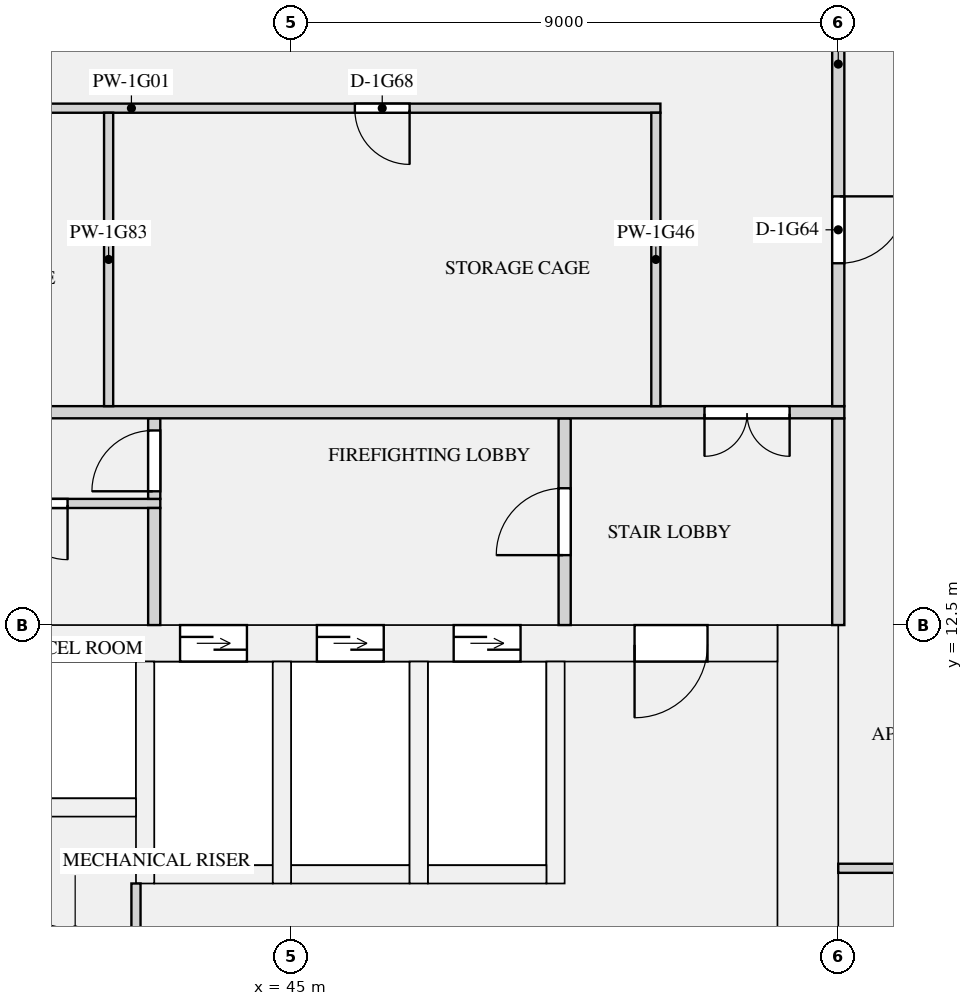
"""IFC4 building model, lengths in metres.
Left out: names, types, materials, properties, quantities, classifications, styles, units other than length and angle.
Written with IfcOpenShell. Run it as: python <this file> out.ifc"""

import sys

from ifc_helpers import new_model, si_unit, direction, frame, frame_2d, origin, place, context, subcontext, project, spatial, rectangle, extrude, element, fill, save


model = new_model("IFC4")
c1 = context("Model", 3, precision=1e-05, world=origin(), true_north=direction((0.0, 1.0)))
c2 = subcontext(c1, "Body", "Model", "MODEL_VIEW")
j1 = project(units=[si_unit("LENGTHUNIT", "METRE"), si_unit("PLANEANGLEUNIT", "RADIAN")], contexts=[c1])
p1 = place(None, origin())
s1 = spatial("IfcSite", under=j1, at=p1, CompositionType="ELEMENT")
p2 = place(p1, origin())
s2 = spatial("IfcBuilding", under=s1, at=p2, CompositionType="ELEMENT")
p3 = place(p2, frame((0.0, 0.0, 66.75)))
s3 = spatial("IfcBuildingStorey", under=s2, at=p3, CompositionType="ELEMENT", Elevation=66.75)
p4 = place(p3, frame((53.5, 0.0, 0.0), z_axis=(0.0, 0.0, 1.0), x_axis=(0.0, 1.0, 0.0)))
e1 = element("IfcWall", 1, at=p4, inside=s3, PredefinedType="SHEAR", context=c2, shape_type="SweptSolid", body=[
    extrude(rectangle(XDim=12.5, YDim=1.0, at=frame_2d((6.25, 0.0))), origin(), (0.0, 0.0, 1.0), 3.15),
])
p5 = place(p3, frame((19.0, 12.2, 0.0), z_axis=(0.0, 0.0, 1.0), x_axis=(1.0, 0.0, 0.0)))
e2 = element("IfcWall", 2, at=p5, inside=s3, PredefinedType="SHEAR", context=c2, shape_type="SweptSolid", body=[
    extrude(rectangle(XDim=34.0, YDim=0.6, at=frame_2d((17.0, 0.0))), origin(), (0.0, 0.0, 1.0), 3.15),
])
p6 = place(p5, frame((4.475, 0.0, 0.0)))
e3 = element("IfcOpeningElement", 3, at=p6, cuts=e2, PredefinedType="OPENING", context=c2, shape_type="SweptSolid", body=[
    extrude(rectangle(XDim=1.2, YDim=2.1, at=frame_2d((0.6, 1.05))), frame((0.0, 0.31, 0.0), z_axis=(0.0, -1.0, 0.0), x_axis=(1.0, 0.0, 0.0)), (0.0, 0.0, 1.0), 0.62),
])
p7 = place(p5, frame((7.325, 0.0, 0.0)))
e4 = element("IfcOpeningElement", 4, at=p7, cuts=e2, PredefinedType="OPENING", context=c2, shape_type="SweptSolid", body=[
    extrude(rectangle(XDim=1.2, YDim=2.1, at=frame_2d((0.6, 1.05))), frame((0.0, 0.31, 0.0), z_axis=(0.0, -1.0, 0.0), x_axis=(1.0, 0.0, 0.0)), (0.0, 0.0, 1.0), 0.62),
])
p8 = place(p5, frame((10.175, 0.0, 0.0)))
e5 = element("IfcOpeningElement", 5, at=p8, cuts=e2, PredefinedType="OPENING", context=c2, shape_type="SweptSolid", body=[
    extrude(rectangle(XDim=1.2, YDim=2.1, at=frame_2d((0.6, 1.05))), frame((0.0, 0.31, 0.0), z_axis=(0.0, -1.0, 0.0), x_axis=(1.0, 0.0, 0.0)), (0.0, 0.0, 1.0), 0.62),
])
p9 = place(p5, frame((13.025, 0.0, 0.0)))
e6 = element("IfcOpeningElement", 6, at=p9, cuts=e2, PredefinedType="OPENING", context=c2, shape_type="SweptSolid", body=[
    extrude(rectangle(XDim=1.2, YDim=2.1, at=frame_2d((0.6, 1.05))), frame((0.0, 0.31, 0.0), z_axis=(0.0, -1.0, 0.0), x_axis=(1.0, 0.0, 0.0)), (0.0, 0.0, 1.0), 0.62),
])
p10 = place(p5, frame((15.875, 0.0, 0.0)))
e7 = element("IfcOpeningElement", 7, at=p10, cuts=e2, PredefinedType="OPENING", context=c2, shape_type="SweptSolid", body=[
    extrude(rectangle(XDim=1.2, YDim=2.1, at=frame_2d((0.6, 1.05))), frame((0.0, 0.31, 0.0), z_axis=(0.0, -1.0, 0.0), x_axis=(1.0, 0.0, 0.0)), (0.0, 0.0, 1.0), 0.62),
])
p11 = place(p5, frame((24.175, 0.0, 0.0)))
e8 = element("IfcOpeningElement", 8, at=p11, cuts=e2, PredefinedType="OPENING", context=c2, shape_type="SweptSolid", body=[
    extrude(rectangle(XDim=1.1, YDim=2.1, at=frame_2d((0.55, 1.05))), frame((0.0, 0.31, 0.0), z_axis=(0.0, -1.0, 0.0), x_axis=(1.0, 0.0, 0.0)), (0.0, 0.0, 1.0), 0.62),
])
p12 = place(p5, frame((26.425, 0.0, 0.0)))
e9 = element("IfcOpeningElement", 9, at=p12, cuts=e2, PredefinedType="OPENING", context=c2, shape_type="SweptSolid", body=[
    extrude(rectangle(XDim=1.1, YDim=2.1, at=frame_2d((0.55, 1.05))), frame((0.0, 0.31, 0.0), z_axis=(0.0, -1.0, 0.0), x_axis=(1.0, 0.0, 0.0)), (0.0, 0.0, 1.0), 0.62),
])
p13 = place(p5, frame((28.675, 0.0, 0.0)))
e10 = element("IfcOpeningElement", 10, at=p13, cuts=e2, PredefinedType="OPENING", context=c2, shape_type="SweptSolid", body=[
    extrude(rectangle(XDim=1.1, YDim=2.1, at=frame_2d((0.55, 1.05))), frame((0.0, 0.31, 0.0), z_axis=(0.0, -1.0, 0.0), x_axis=(1.0, 0.0, 0.0)), (0.0, 0.0, 1.0), 0.62),
])
p14 = place(p5, frame((1.15, 0.0, 0.0)))
e11 = element("IfcOpeningElement", 11, at=p14, cuts=e2, PredefinedType="OPENING", context=c2, shape_type="SweptSolid", body=[
    extrude(rectangle(XDim=1.2, YDim=2.1, at=frame_2d((0.6, 1.05))), frame((0.0, 0.31, 0.0), z_axis=(0.0, -1.0, 0.0), x_axis=(1.0, 0.0, 0.0)), (0.0, 0.0, 1.0), 0.62),
])
p15 = place(p5, frame((31.65, 0.0, 0.0)))
e12 = element("IfcOpeningElement", 12, at=p15, cuts=e2, PredefinedType="OPENING", context=c2, shape_type="SweptSolid", body=[
    extrude(rectangle(XDim=1.2, YDim=2.1, at=frame_2d((0.6, 1.05))), frame((0.0, 0.31, 0.0), z_axis=(0.0, -1.0, 0.0), x_axis=(1.0, 0.0, 0.0)), (0.0, 0.0, 1.0), 0.62),
])
p16 = place(p3, frame((39.9, 9.5, 0.0), z_axis=(0.0, 0.0, 1.0), x_axis=(1.0, 0.0, 0.0)))
e13 = element("IfcWall", 13, at=p16, inside=s3, PredefinedType="SHEAR", context=c2, shape_type="SweptSolid", body=[
    extrude(rectangle(XDim=2.55, YDim=0.3, at=frame_2d((1.275, 0.0))), origin(), (0.0, 0.0, 1.0), 3.15),
])
p17 = place(p3, frame((42.75, 8.4, 0.0), z_axis=(0.0, 0.0, 1.0), x_axis=(1.0, 0.0, 0.0)))
e14 = element("IfcWall", 14, at=p17, inside=s3, PredefinedType="SHEAR", context=c2, shape_type="SweptSolid", body=[
    extrude(rectangle(XDim=1.95, YDim=0.3, at=frame_2d((0.975, 0.0))), origin(), (0.0, 0.0, 1.0), 3.15),
])
p18 = place(p3, frame((42.6, 8.25, 0.0), z_axis=(0.0, 0.0, 1.0), x_axis=(0.0, 1.0, 0.0)))
e15 = element("IfcWall", 15, at=p18, inside=s3, PredefinedType="SHEAR", context=c2, shape_type="SweptSolid", body=[
    extrude(rectangle(XDim=3.65, YDim=0.3, at=frame_2d((1.825, 0.0))), origin(), (0.0, 0.0, 1.0), 3.15),
])
p19 = place(p3, frame((45.0, 8.4, 0.0), z_axis=(0.0, 0.0, 1.0), x_axis=(1.0, 0.0, 0.0)))
e16 = element("IfcWall", 16, at=p19, inside=s3, PredefinedType="SHEAR", context=c2, shape_type="SweptSolid", body=[
    extrude(rectangle(XDim=1.95, YDim=0.3, at=frame_2d((0.975, 0.0))), origin(), (0.0, 0.0, 1.0), 3.15),
])
p20 = place(p3, frame((44.85, 8.25, 0.0), z_axis=(0.0, 0.0, 1.0), x_axis=(0.0, 1.0, 0.0)))
e17 = element("IfcWall", 17, at=p20, inside=s3, PredefinedType="SHEAR", context=c2, shape_type="SweptSolid", body=[
    extrude(rectangle(XDim=3.65, YDim=0.3, at=frame_2d((1.825, 0.0))), origin(), (0.0, 0.0, 1.0), 3.15),
])
p21 = place(p3, frame((47.25, 8.4, 0.0), z_axis=(0.0, 0.0, 1.0), x_axis=(1.0, 0.0, 0.0)))
e18 = element("IfcWall", 18, at=p21, inside=s3, PredefinedType="SHEAR", context=c2, shape_type="SweptSolid", body=[
    extrude(rectangle(XDim=1.95, YDim=0.3, at=frame_2d((0.975, 0.0))), origin(), (0.0, 0.0, 1.0), 3.15),
])
for number, where, z_axis, x_axis in (
    (19, (47.1, 8.25, 0.0), (0.0, 0.0, 1.0), (0.0, 1.0, 0.0)),
    (20, (49.35, 8.25, 0.0), (0.0, 0.0, 1.0), (0.0, 1.0, 0.0)),
):
    element("IfcWall", number, at=place(p3, frame(where, z_axis=z_axis, x_axis=x_axis)), inside=s3, PredefinedType="SHEAR", context=c2, shape_type="SweptSolid", body=[
        extrude(rectangle(XDim=3.65, YDim=0.3, at=frame_2d((1.825, 0.0))), origin(), (0.0, 0.0, 1.0), 3.15),
    ])
p22 = place(p3, frame((38.925, 14.5, 0.0), z_axis=(0.0, 0.0, 1.0), x_axis=(1.0, 0.0, 0.0)))
e21 = element("IfcWall", 21, at=p22, inside=s3, PredefinedType="PARTITIONING", context=c2, shape_type="SweptSolid", body=[
    extrude(rectangle(XDim=3.925, YDim=0.15, at=frame_2d((1.962, 0.0))), origin(), (0.0, 0.0, 1.0), 2.83),
])
p23 = place(p22, frame((1.5, 0.0, 0.0)))
e22 = element("IfcOpeningElement", 22, at=p23, cuts=e21, PredefinedType="OPENING", context=c2, shape_type="SweptSolid", body=[
    extrude(rectangle(XDim=0.9, YDim=2.1, at=frame_2d((0.45, 1.05))), frame((0.0, 0.085, 0.0), z_axis=(0.0, -1.0, 0.0), x_axis=(1.0, 0.0, 0.0)), (0.0, 0.0, 1.0), 0.17),
])
p24 = place(p3, frame((42.45, 6.65, 0.0), z_axis=(0.0, 0.0, 1.0), x_axis=(0.0, 1.0, 0.0)))
e23 = element("IfcWall", 23, at=p24, inside=s3, PredefinedType="PARTITIONING", context=c2, shape_type="SweptSolid", body=[
    extrude(rectangle(XDim=1.6, YDim=0.15, at=frame_2d((0.8, 0.0))), origin(), (0.0, 0.0, 1.0), 2.83),
])
p25 = place(p3, frame((42.75, 12.5, 0.0), z_axis=(0.0, 0.0, 1.0), x_axis=(0.0, 1.0, 0.0)))
e24 = element("IfcWall", 24, at=p25, inside=s3, PredefinedType="PARTITIONING", context=c2, shape_type="SweptSolid", body=[
    extrude(rectangle(XDim=1.925, YDim=0.2, at=frame_2d((0.962, 0.0))), origin(), (0.0, 0.0, 1.0), 2.83),
])
p26 = place(p3, frame((49.5, 12.5, 0.0), z_axis=(0.0, 0.0, 1.0), x_axis=(0.0, 1.0, 0.0)))
e25 = element("IfcWall", 25, at=p26, inside=s3, PredefinedType="PARTITIONING", context=c2, shape_type="SweptSolid", body=[
    extrude(rectangle(XDim=3.4, YDim=0.2, at=frame_2d((1.7, 0.0))), origin(), (0.0, 0.0, 1.0), 2.83),
])
p27 = place(p26, frame((1.15, 0.0, 0.0)))
e26 = element("IfcOpeningElement", 26, at=p27, cuts=e25, PredefinedType="OPENING", context=c2, shape_type="SweptSolid", body=[
    extrude(rectangle(XDim=1.1, YDim=2.1, at=frame_2d((0.55, 1.05))), frame((0.0, 0.11, 0.0), z_axis=(0.0, -1.0, 0.0), x_axis=(1.0, 0.0, 0.0)), (0.0, 0.0, 1.0), 0.22),
])
p28 = place(p3, frame((54.0, 12.5, 0.0), z_axis=(0.0, 0.0, 1.0), x_axis=(0.0, 1.0, 0.0)))
e27 = element("IfcWall", 27, at=p28, inside=s3, PredefinedType="PARTITIONING", context=c2, shape_type="SweptSolid", body=[
    extrude(rectangle(XDim=3.4, YDim=0.2, at=frame_2d((1.7, 0.0))), origin(), (0.0, 0.0, 1.0), 2.83),
])
p29 = place(p3, frame((42.75, 14.575, 0.0), z_axis=(0.0, 0.0, 1.0), x_axis=(0.0, 1.0, 0.0)))
e28 = element("IfcWall", 28, at=p29, inside=s3, PredefinedType="PARTITIONING", context=c2, shape_type="SweptSolid", body=[
    extrude(rectangle(XDim=1.325, YDim=0.2, at=frame_2d((0.663, 0.0))), origin(), (0.0, 0.0, 1.0), 2.83),
])
p30 = place(p29, frame((0.125, 0.0, 0.0)))
e29 = element("IfcOpeningElement", 29, at=p30, cuts=e28, PredefinedType="OPENING", context=c2, shape_type="SweptSolid", body=[
    extrude(rectangle(XDim=1.0, YDim=2.1, at=frame_2d((0.5, 1.05))), frame((0.0, 0.11, 0.0), z_axis=(0.0, -1.0, 0.0), x_axis=(1.0, 0.0, 0.0)), (0.0, 0.0, 1.0), 0.22),
])
p31 = place(p3, frame((20.925, 21.0, 0.0), z_axis=(0.0, 0.0, 1.0), x_axis=(1.0, 0.0, 0.0)))
e30 = element("IfcWall", 30, at=p31, inside=s3, PredefinedType="PARTITIONING", context=c2, shape_type="SweptSolid", body=[
    extrude(rectangle(XDim=30.15, YDim=0.15, at=frame_2d((15.075, 0.0))), origin(), (0.0, 0.0, 1.0), 2.83),
])
p32 = place(p31, frame((4.125, 0.0, 0.0)))
e31 = element("IfcOpeningElement", 31, at=p32, cuts=e30, PredefinedType="OPENING", context=c2, shape_type="SweptSolid", body=[
    extrude(rectangle(XDim=0.9, YDim=2.1, at=frame_2d((0.45, 1.05))), frame((0.0, 0.085, 0.0), z_axis=(0.0, -1.0, 0.0), x_axis=(1.0, 0.0, 0.0)), (0.0, 0.0, 1.0), 0.17),
])
p33 = place(p31, frame((10.875, 0.0, 0.0)))
e32 = element("IfcOpeningElement", 32, at=p33, cuts=e30, PredefinedType="OPENING", context=c2, shape_type="SweptSolid", body=[
    extrude(rectangle(XDim=0.9, YDim=2.1, at=frame_2d((0.45, 1.05))), frame((0.0, 0.085, 0.0), z_axis=(0.0, -1.0, 0.0), x_axis=(1.0, 0.0, 0.0)), (0.0, 0.0, 1.0), 0.17),
])
p34 = place(p31, frame((16.875, 0.0, 0.0)))
e33 = element("IfcOpeningElement", 33, at=p34, cuts=e30, PredefinedType="OPENING", context=c2, shape_type="SweptSolid", body=[
    extrude(rectangle(XDim=0.9, YDim=2.1, at=frame_2d((0.45, 1.05))), frame((0.0, 0.085, 0.0), z_axis=(0.0, -1.0, 0.0), x_axis=(1.0, 0.0, 0.0)), (0.0, 0.0, 1.0), 0.17),
])
p35 = place(p31, frame((25.125, 0.0, 0.0)))
e34 = element("IfcOpeningElement", 34, at=p35, cuts=e30, PredefinedType="OPENING", context=c2, shape_type="SweptSolid", body=[
    extrude(rectangle(XDim=0.9, YDim=2.1, at=frame_2d((0.45, 1.05))), frame((0.0, 0.085, 0.0), z_axis=(0.0, -1.0, 0.0), x_axis=(1.0, 0.0, 0.0)), (0.0, 0.0, 1.0), 0.17),
])
p36 = place(p3, frame((54.0, 8.5, 0.0), z_axis=(0.0, 0.0, 1.0), x_axis=(1.0, 0.0, 0.0)))
e35 = element("IfcWall", 35, at=p36, inside=s3, PredefinedType="PARTITIONING", context=c2, shape_type="SweptSolid", body=[
    extrude(rectangle(XDim=21.7, YDim=0.15, at=frame_2d((10.85, 0.0))), origin(), (0.0, 0.0, 1.0), 2.83),
])
p37 = place(p36, frame((6.3, 0.0, 0.0)))
e36 = element("IfcOpeningElement", 36, at=p37, cuts=e35, PredefinedType="OPENING", context=c2, shape_type="SweptSolid", body=[
    extrude(rectangle(XDim=0.9, YDim=2.1, at=frame_2d((0.45, 1.05))), frame((0.0, 0.085, 0.0), z_axis=(0.0, -1.0, 0.0), x_axis=(1.0, 0.0, 0.0)), (0.0, 0.0, 1.0), 0.17),
])
p38 = place(p36, frame((1.8, 0.0, 0.0)))
e37 = element("IfcOpeningElement", 37, at=p38, cuts=e35, PredefinedType="OPENING", context=c2, shape_type="SweptSolid", body=[
    extrude(rectangle(XDim=0.9, YDim=2.1, at=frame_2d((0.45, 1.05))), frame((0.0, 0.085, 0.0), z_axis=(0.0, -1.0, 0.0), x_axis=(1.0, 0.0, 0.0)), (0.0, 0.0, 1.0), 0.17),
])
p39 = place(p36, frame((10.8, 0.0, 0.0)))
e38 = element("IfcOpeningElement", 38, at=p39, cuts=e35, PredefinedType="OPENING", context=c2, shape_type="SweptSolid", body=[
    extrude(rectangle(XDim=0.9, YDim=2.1, at=frame_2d((0.45, 1.05))), frame((0.0, 0.085, 0.0), z_axis=(0.0, -1.0, 0.0), x_axis=(1.0, 0.0, 0.0)), (0.0, 0.0, 1.0), 0.17),
])
p40 = place(p36, frame((19.175, 0.0, 0.0)))
e39 = element("IfcOpeningElement", 39, at=p40, cuts=e35, PredefinedType="OPENING", context=c2, shape_type="SweptSolid", body=[
    extrude(rectangle(XDim=1.5, YDim=2.1, at=frame_2d((0.75, 1.05))), frame((0.0, 0.085, 0.0), z_axis=(0.0, -1.0, 0.0), x_axis=(1.0, 0.0, 0.0)), (0.0, 0.0, 1.0), 0.17),
])
p41 = place(p3, frame((17.9, 16.0, 0.0), z_axis=(0.0, 0.0, 1.0), x_axis=(1.0, 0.0, 0.0)))
e40 = element("IfcWall", 40, at=p41, inside=s3, PredefinedType="PARTITIONING", context=c2, shape_type="SweptSolid", body=[
    extrude(rectangle(XDim=36.2, YDim=0.2, at=frame_2d((18.1, 0.0))), origin(), (0.0, 0.0, 1.0), 2.83),
])
p42 = place(p41, frame((0.9, 0.0, 0.0)))
e41 = element("IfcOpeningElement", 41, at=p42, cuts=e40, PredefinedType="OPENING", context=c2, shape_type="SweptSolid", body=[
    extrude(rectangle(XDim=1.4, YDim=2.1, at=frame_2d((0.7, 1.05))), frame((0.0, 0.11, 0.0), z_axis=(0.0, -1.0, 0.0), x_axis=(1.0, 0.0, 0.0)), (0.0, 0.0, 1.0), 0.22),
])
p43 = place(p41, frame((33.9, 0.0, 0.0)))
e42 = element("IfcOpeningElement", 42, at=p43, cuts=e40, PredefinedType="OPENING", context=c2, shape_type="SweptSolid", body=[
    extrude(rectangle(XDim=1.4, YDim=2.1, at=frame_2d((0.7, 1.05))), frame((0.0, 0.11, 0.0), z_axis=(0.0, -1.0, 0.0), x_axis=(1.0, 0.0, 0.0)), (0.0, 0.0, 1.0), 0.22),
])
p44 = place(p3, frame((54.0, 16.1, 0.0), z_axis=(0.0, 0.0, 1.0), x_axis=(0.0, 1.0, 0.0)))
e43 = element("IfcWall", 43, at=p44, inside=s3, PredefinedType="PARTITIONING", context=c2, shape_type="SweptSolid", body=[
    extrude(rectangle(XDim=7.8, YDim=0.2, at=frame_2d((3.9, 0.0))), origin(), (0.0, 0.0, 1.0), 2.83),
])
p45 = place(p44, frame((2.35, 0.0, 0.0)))
e44 = element("IfcOpeningElement", 44, at=p45, cuts=e43, PredefinedType="OPENING", context=c2, shape_type="SweptSolid", body=[
    extrude(rectangle(XDim=1.1, YDim=2.1, at=frame_2d((0.55, 1.05))), frame((0.0, 0.11, 0.0), z_axis=(0.0, -1.0, 0.0), x_axis=(1.0, 0.0, 0.0)), (0.0, 0.0, 1.0), 0.22),
])
for number, where, z_axis, x_axis in (
    (45, (51.0, 16.1, 0.0), (0.0, 0.0, 1.0), (0.0, 1.0, 0.0)),
    (46, (42.0, 16.1, 0.0), (0.0, 0.0, 1.0), (0.0, 1.0, 0.0)),
):
    element("IfcWall", number, at=place(p3, frame(where, z_axis=z_axis, x_axis=x_axis)), inside=s3, PredefinedType="PARTITIONING", context=c2, shape_type="SweptSolid", body=[
        extrude(rectangle(XDim=4.825, YDim=0.15, at=frame_2d((2.413, 0.0))), origin(), (0.0, 0.0, 1.0), 2.83),
    ])
p46 = place(p11, origin())
e47 = element("IfcDoor", 47, at=p46, inside=s3, OperationType="DOUBLE_DOOR_SLIDING", PredefinedType="DOOR", context=c2, shape_type="SweptSolid", body=[
    extrude(rectangle(XDim=1.1, YDim=2.1, at=frame_2d((0.55, 1.05))), frame((0.0, 0.025, 0.0), z_axis=(0.0, -1.0, 0.0), x_axis=(1.0, 0.0, 0.0)), (0.0, 0.0, 1.0), 0.05),
])
fill(e8, e47)
p47 = place(p12, origin())
e48 = element("IfcDoor", 48, at=p47, inside=s3, OperationType="DOUBLE_DOOR_SLIDING", PredefinedType="DOOR", context=c2, shape_type="SweptSolid", body=[
    extrude(rectangle(XDim=1.1, YDim=2.1, at=frame_2d((0.55, 1.05))), frame((0.0, 0.025, 0.0), z_axis=(0.0, -1.0, 0.0), x_axis=(1.0, 0.0, 0.0)), (0.0, 0.0, 1.0), 0.05),
])
fill(e9, e48)
p48 = place(p13, origin())
e49 = element("IfcDoor", 49, at=p48, inside=s3, OperationType="DOUBLE_DOOR_SLIDING", PredefinedType="DOOR", context=c2, shape_type="SweptSolid", body=[
    extrude(rectangle(XDim=1.1, YDim=2.1, at=frame_2d((0.55, 1.05))), frame((0.0, 0.025, 0.0), z_axis=(0.0, -1.0, 0.0), x_axis=(1.0, 0.0, 0.0)), (0.0, 0.0, 1.0), 0.05),
])
fill(e10, e49)
p49 = place(p23, frame((0.9, 0.0, 0.0), z_axis=(0.0, 0.0, 1.0), x_axis=(-1.0, 0.0, 0.0)))
e50 = element("IfcDoor", 50, at=p49, inside=s3, OperationType="SINGLE_SWING_LEFT", PredefinedType="DOOR", context=c2, shape_type="SweptSolid", body=[
    extrude(rectangle(XDim=0.9, YDim=2.1, at=frame_2d((0.45, 1.05))), frame((0.0, 0.025, 0.0), z_axis=(0.0, -1.0, 0.0), x_axis=(1.0, 0.0, 0.0)), (0.0, 0.0, 1.0), 0.05),
])
fill(e22, e50)
p50 = place(p15, frame((1.2, 0.0, 0.0), z_axis=(0.0, 0.0, 1.0), x_axis=(-1.0, 0.0, 0.0)))
e51 = element("IfcDoor", 51, at=p50, inside=s3, OperationType="SINGLE_SWING_RIGHT", PredefinedType="DOOR", context=c2, shape_type="SweptSolid", body=[
    extrude(rectangle(XDim=1.2, YDim=2.1, at=frame_2d((0.6, 1.05))), frame((0.0, 0.025, 0.0), z_axis=(0.0, -1.0, 0.0), x_axis=(1.0, 0.0, 0.0)), (0.0, 0.0, 1.0), 0.05),
])
fill(e12, e51)
p51 = place(p30, origin())
e52 = element("IfcDoor", 52, at=p51, inside=s3, OperationType="SINGLE_SWING_LEFT", PredefinedType="DOOR", context=c2, shape_type="SweptSolid", body=[
    extrude(rectangle(XDim=1.0, YDim=2.1, at=frame_2d((0.5, 1.05))), frame((0.0, 0.025, 0.0), z_axis=(0.0, -1.0, 0.0), x_axis=(1.0, 0.0, 0.0)), (0.0, 0.0, 1.0), 0.05),
])
fill(e29, e52)
p52 = place(p27, origin())
e53 = element("IfcDoor", 53, at=p52, inside=s3, OperationType="SINGLE_SWING_LEFT", PredefinedType="DOOR", context=c2, shape_type="SweptSolid", body=[
    extrude(rectangle(XDim=1.1, YDim=2.1, at=frame_2d((0.55, 1.05))), frame((0.0, 0.025, 0.0), z_axis=(0.0, -1.0, 0.0), x_axis=(1.0, 0.0, 0.0)), (0.0, 0.0, 1.0), 0.05),
])
fill(e26, e53)
p53 = place(p43, frame((1.4, 0.0, 0.0), z_axis=(0.0, 0.0, 1.0), x_axis=(-1.0, 0.0, 0.0)))
e54 = element("IfcDoor", 54, at=p53, inside=s3, OperationType="DOUBLE_DOOR_SINGLE_SWING", PredefinedType="DOOR", context=c2, shape_type="SweptSolid", body=[
    extrude(rectangle(XDim=1.4, YDim=2.1, at=frame_2d((0.7, 1.05))), frame((0.0, 0.025, 0.0), z_axis=(0.0, -1.0, 0.0), x_axis=(1.0, 0.0, 0.0)), (0.0, 0.0, 1.0), 0.05),
])
fill(e42, e54)
p54 = place(p45, frame((1.1, 0.0, 0.0), z_axis=(0.0, 0.0, 1.0), x_axis=(-1.0, 0.0, 0.0)))
e55 = element("IfcDoor", 55, at=p54, inside=s3, OperationType="SINGLE_SWING_LEFT", PredefinedType="DOOR", context=c2, shape_type="SweptSolid", body=[
    extrude(rectangle(XDim=1.1, YDim=2.1, at=frame_2d((0.55, 1.05))), frame((0.0, 0.025, 0.0), z_axis=(0.0, -1.0, 0.0), x_axis=(1.0, 0.0, 0.0)), (0.0, 0.0, 1.0), 0.05),
])
fill(e44, e55)
p55 = place(p35, frame((0.9, 0.0, 0.0), z_axis=(0.0, 0.0, 1.0), x_axis=(-1.0, 0.0, 0.0)))
e56 = element("IfcDoor", 56, at=p55, inside=s3, OperationType="SINGLE_SWING_LEFT", PredefinedType="DOOR", context=c2, shape_type="SweptSolid", body=[
    extrude(rectangle(XDim=0.9, YDim=2.1, at=frame_2d((0.45, 1.05))), frame((0.0, 0.025, 0.0), z_axis=(0.0, -1.0, 0.0), x_axis=(1.0, 0.0, 0.0)), (0.0, 0.0, 1.0), 0.05),
])
fill(e34, e56)
save(model, sys.argv[1])
